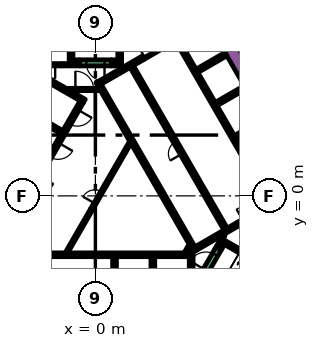
"""IFC4 building model, lengths in metres.
Left out: names, types, materials, properties, quantities, classifications, styles, units other than length and angle.
Written with IfcOpenShell. Run it as: python <this file> out.ifc"""

import sys

from ifc_helpers import new_model, si_unit, direction, frame, frame_2d, origin, place, context, subcontext, project, spatial, polyline, rectangle, outline, extrude, element, fill, save


model = new_model("IFC4")
c1 = context("Model", 3, precision=1e-05, world=origin(), true_north=direction((0.0, 1.0)))
c2 = subcontext(c1, "Body", "Model", "MODEL_VIEW")
j1 = project(units=[si_unit("LENGTHUNIT", "METRE"), si_unit("PLANEANGLEUNIT", "RADIAN")], contexts=[c1])
p1 = place(None, origin())
s1 = spatial("IfcSite", under=j1, at=p1, CompositionType="ELEMENT")
p2 = place(p1, origin())
s2 = spatial("IfcBuilding", under=s1, at=p2, CompositionType="ELEMENT")
p3 = place(p2, frame((0.0, 0.0, 6.0)))
s3 = spatial("IfcBuildingStorey", under=s2, at=p3, CompositionType="ELEMENT", Elevation=6.0)
p4 = place(p3, frame((6.776, 13.364, 0.0), z_axis=(0.0, 0.0, 1.0), x_axis=(0.500004177138, -0.8660229921, 0.0)))
e1 = element("IfcWall", 1, at=p4, inside=s3, PredefinedType="SOLIDWALL", context=c2, shape_type="SweptSolid", body=[
    extrude(rectangle(XDim=20.204, YDim=0.9, at=frame_2d((10.102, 0.0))), origin(), (0.0, 0.0, 1.0), 5.4),
])
p5 = place(p3, frame((8.334, -2.964, 0.0), z_axis=(0.0, 0.0, 1.0), x_axis=(0.866016039709, -0.500016218704, 0.0)))
e2 = element("IfcWall", 2, at=p5, inside=s3, PredefinedType="SOLIDWALL", context=c2, shape_type="SweptSolid", body=[
    extrude(rectangle(XDim=7.05, YDim=0.25, at=frame_2d((3.525, 0.0))), origin(), (0.0, 0.0, 1.0), 5.4),
])
p6 = place(p3, frame((8.168, -3.503, 0.0), z_axis=(0.0, 0.0, 1.0), x_axis=(0.49972245349, 0.866185586049, 0.0)))
e3 = element("IfcWall", 3, at=p6, inside=s3, PredefinedType="SOLIDWALL", context=c2, shape_type="SweptSolid", body=[
    extrude(rectangle(XDim=0.425, YDim=0.25, at=frame_2d((0.212, 0.0))), origin(), (0.0, 0.0, 1.0), 5.4),
])
p7 = place(p3, frame((1.6, 8.95, 0.0), z_axis=(0.0, 0.0, 1.0), x_axis=(0.0, 1.0, 0.0)))
e4 = element("IfcWall", 4, at=p7, inside=s3, PredefinedType="SOLIDWALL", context=c2, shape_type="SweptSolid", body=[
    extrude(rectangle(XDim=6.8, YDim=0.25, at=frame_2d((3.4, 0.0))), origin(), (0.0, 0.0, 1.0), 5.4),
])
p8 = place(p3, frame((1.05, 8.825, 0.0), z_axis=(0.0, 0.0, 1.0), x_axis=(1.0, 0.0, 0.0)))
e5 = element("IfcWall", 5, at=p8, inside=s3, PredefinedType="SOLIDWALL", context=c2, shape_type="SweptSolid", body=[
    extrude(rectangle(XDim=0.675, YDim=0.25, at=frame_2d((0.337, 0.0))), origin(), (0.0, 0.0, 1.0), 5.4),
])
p9 = place(p3, frame((-1.6, 8.7, 0.0), z_axis=(0.0, 0.0, 1.0), x_axis=(0.0, 1.0, 0.0)))
e6 = element("IfcWall", 6, at=p9, inside=s3, PredefinedType="SOLIDWALL", context=c2, shape_type="SweptSolid", body=[
    extrude(rectangle(XDim=7.05, YDim=0.25, at=frame_2d((3.525, 0.0))), origin(), (0.0, 0.0, 1.0), 5.4),
])
p10 = place(p3, frame((-1.475, 8.825, 0.0), z_axis=(0.0, 0.0, 1.0), x_axis=(1.0, 0.0, 0.0)))
e7 = element("IfcWall", 7, at=p10, inside=s3, PredefinedType="SOLIDWALL", context=c2, shape_type="SweptSolid", body=[
    extrude(rectangle(XDim=0.425, YDim=0.25, at=frame_2d((0.212, 0.0))), origin(), (0.0, 0.0, 1.0), 5.4),
])
p11 = place(p3, frame((-5.845, -3.875, 0.0), z_axis=(0.0, 0.0, 1.0), x_axis=(1.0, 0.0, 0.0)))
e8 = element("IfcWall", 8, at=p11, inside=s3, PredefinedType="SOLIDWALL", context=c2, shape_type="SweptSolid", body=[
    extrude(rectangle(XDim=12.27, YDim=0.25, at=frame_2d((6.135, 0.0))), origin(), (0.0, 0.0, 1.0), 5.4),
])
p12 = place(p3, frame((6.3, -7.27, 0.0), z_axis=(0.0, 0.0, 1.0), x_axis=(0.0, 1.0, 0.0)))
e9 = element("IfcWall", 9, at=p12, inside=s3, PredefinedType="SOLIDWALL", context=c2, shape_type="SweptSolid", body=[
    extrude(rectangle(XDim=3.27, YDim=0.25, at=frame_2d((1.635, 0.0))), origin(), (0.0, 0.0, 1.0), 5.4),
])
for number, where, z_axis, x_axis in (
    (10, (3.78, -4.0, 0.0), (0.0, 0.0, 1.0), (0.0, -1.0, 0.0)),
    (11, (1.26, -4.0, 0.0), (0.0, 0.0, 1.0), (0.0, -1.0, 0.0)),
):
    element("IfcWall", number, at=place(p3, frame(where, z_axis=z_axis, x_axis=x_axis)), inside=s3, PredefinedType="SOLIDWALL", context=c2, shape_type="SweptSolid", body=[
        extrude(rectangle(XDim=2.2, YDim=0.25, at=frame_2d((1.1, 0.0))), origin(), (0.0, 0.0, 1.0), 5.4),
    ])
p13 = place(p3, frame((11.678, -0.677, 0.0), z_axis=(0.0, 0.0, 1.0), x_axis=(-0.500003135297, 0.866023593612, 0.0)))
e12 = element("IfcWall", 12, at=p13, inside=s3, PredefinedType="SOLIDWALL", context=c2, shape_type="SweptSolid", body=[
    extrude(rectangle(XDim=12.85, YDim=0.25, at=frame_2d((6.425, 0.0))), origin(), (0.0, 0.0, 1.0), 5.4),
])
p14 = place(p3, origin())
e13 = element("IfcWall", 13, at=p14, inside=s3, PredefinedType="SOLIDWALL", context=c2, shape_type="SweptSolid", body=[
    extrude(outline(polyline([(6.552, -3.348), (6.677, -3.564), (6.46, -3.689), (4.897, -0.981), (0.332, 6.925), (0.335, 6.925), (0.335, 6.925), (0.335, 6.925), (0.335, 7.075), (0.335, 7.075), (0.335, 7.075), (0.245, 7.075), (0.079, 7.363), (0.035, 7.439), (0.252, 7.564), (0.377, 7.348), (6.552, -3.348)])), origin(), (0.0, 0.0, 1.0), 5.4),
])
p15 = place(p3, frame((0.314, 7.456, 0.0), z_axis=(0.0, 0.0, 1.0), x_axis=(0.866013897511, 0.50001992892, 0.0)))
e14 = element("IfcWall", 14, at=p15, inside=s3, PredefinedType="SOLIDWALL", context=c2, shape_type="SweptSolid", body=[
    extrude(rectangle(XDim=3.268, YDim=0.25, at=frame_2d((1.634, 0.0))), origin(), (0.0, 0.0, 1.0), 5.4),
])
p16 = place(p3, frame((6.614, -3.456, 0.0), z_axis=(0.0, 0.0, 1.0), x_axis=(0.86602447079, 0.500001615989, 0.0)))
e15 = element("IfcWall", 15, at=p16, inside=s3, PredefinedType="SOLIDWALL", context=c2, shape_type="SweptSolid", body=[
    extrude(rectangle(XDim=3.154, YDim=0.25, at=frame_2d((1.577, 0.0))), origin(), (0.0, 0.0, 1.0), 5.4),
])
for number, where, z_axis, x_axis in (
    (16, (8.589, 9.323, 0.0), (0.0, 0.0, 1.0), (-0.866, -0.5, 0.0)),
    (17, (7.944, 6.041, 0.0), (0.0, 0.0, 1.0), (0.866, 0.5, 0.0)),
    (18, (9.204, 3.859, 0.0), (0.0, 0.0, 1.0), (0.866, 0.5, 0.0)),
):
    element("IfcWall", number, at=place(p3, frame(where, z_axis=z_axis, x_axis=x_axis)), inside=s3, PredefinedType="SOLIDWALL", context=c2, shape_type="SweptSolid", body=[
        extrude(rectangle(XDim=2.2, YDim=0.25, at=frame_2d((1.1, 0.0))), origin(), (0.0, 0.0, 1.0), 5.4),
    ])
p17 = place(p3, frame((-8.06, -1.311, 0.0), z_axis=(0.0, 0.0, 1.0), x_axis=(0.50000273126, 0.866023826885, 0.0)))
e19 = element("IfcWall", 19, at=p17, inside=s3, PredefinedType="SOLIDWALL", context=c2, shape_type="SweptSolid", body=[
    extrude(rectangle(XDim=10.33, YDim=0.25, at=frame_2d((5.165, 0.0))), origin(), (0.0, 0.0, 1.0), 5.4),
])
p18 = place(p3, frame((-1.819, 6.87, 0.0), z_axis=(0.0, 0.0, 1.0), x_axis=(-0.866294599386, 0.499533449405, 0.0)))
e20 = element("IfcWall", 20, at=p18, inside=s3, PredefinedType="SOLIDWALL", context=c2, shape_type="SweptSolid", body=[
    extrude(rectangle(XDim=0.41, YDim=0.25, at=frame_2d((0.205, 0.0))), origin(), (0.0, 0.0, 1.0), 5.4),
])
p19 = place(p3, frame((-2.849, 7.465, 0.0), z_axis=(0.0, 0.0, 1.0), x_axis=(0.865955664968, -0.500120771724, 0.0)))
e21 = element("IfcWall", 21, at=p19, inside=s3, PredefinedType="SOLIDWALL", context=c2, shape_type="SweptSolid", body=[
    extrude(rectangle(XDim=0.778, YDim=0.25, at=frame_2d((0.389, 0.0))), origin(), (0.0, 0.0, 1.0), 5.4),
])
p20 = place(p3, frame((-0.728, 6.24, 0.0), z_axis=(0.0, 0.0, 1.0), x_axis=(-0.866002680491, 0.500039355833, 0.0)))
e22 = element("IfcWall", 22, at=p20, inside=s3, PredefinedType="SOLIDWALL", context=c2, shape_type="SweptSolid", body=[
    extrude(rectangle(XDim=1.178, YDim=0.25, at=frame_2d((0.589, 0.0))), origin(), (0.0, 0.0, 1.0), 5.4),
])
p21 = place(p3, frame((-2.204, 4.182, 0.0), z_axis=(0.0, 0.0, 1.0), x_axis=(-0.866008176907, 0.50002983664, 0.0)))
e23 = element("IfcWall", 23, at=p21, inside=s3, PredefinedType="SOLIDWALL", context=c2, shape_type="SweptSolid", body=[
    extrude(rectangle(XDim=2.2, YDim=0.25, at=frame_2d((1.1, 0.0))), origin(), (0.0, 0.0, 1.0), 5.4),
])
p22 = place(p3, frame((-2.196, 8.625, 0.0), z_axis=(0.0, 0.0, 1.0), x_axis=(1.0, 0.0, 0.0)))
e24 = element("IfcWall", 24, at=p22, inside=s3, PredefinedType="PARTITIONING", context=c2, shape_type="SweptSolid", body=[
    extrude(rectangle(XDim=1.146, YDim=0.15, at=frame_2d((0.573, 0.0))), origin(), (0.0, 0.0, 1.0), 4.5),
])
p23 = place(p3, frame((5.936, -3.718, 0.0), z_axis=(0.0, 0.0, 1.0), x_axis=(0.499890179513, 0.866088799389, 0.0)))
e25 = element("IfcWall", 25, at=p23, inside=s3, PredefinedType="PARTITIONING", context=c2, shape_type="SweptSolid", body=[
    extrude(rectangle(XDim=0.504, YDim=0.15, at=frame_2d((0.252, 0.0))), origin(), (0.0, 0.0, 1.0), 4.5),
])
p24 = place(p3, frame((8.459, -2.599, 0.0), z_axis=(0.0, 0.0, 1.0), x_axis=(-0.500041054325, -0.866001699761, 0.0)))
e26 = element("IfcWall", 26, at=p24, inside=s3, PredefinedType="PARTITIONING", context=c2, shape_type="SweptSolid", body=[
    extrude(rectangle(XDim=0.929, YDim=0.15, at=frame_2d((0.464, 0.0))), origin(), (0.0, 0.0, 1.0), 5.4),
])
for number, where, z_axis, x_axis in (
    (27, (-1.887, -3.718, 0.0), (0.0, 0.0, 1.0), (0.5, 0.866, 0.0)),
    (28, (0.645, 0.667, 0.0), (0.0, 0.0, 1.0), (0.5, 0.866, 0.0)),
):
    element("IfcWall", number, at=place(p3, frame(where, z_axis=z_axis, x_axis=x_axis)), inside=s3, PredefinedType="PARTITIONING", context=c2, shape_type="SweptSolid", body=[
        extrude(rectangle(XDim=3.263, YDim=0.15, at=frame_2d((1.632, 0.0))), origin(), (0.0, 0.0, 1.0), 4.5),
    ])
p25 = place(p3, frame((1.05, 8.625, 0.0), z_axis=(0.0, 0.0, 1.0), x_axis=(1.0, 0.0, 0.0)))
e29 = element("IfcWall", 29, at=p25, inside=s3, PredefinedType="PARTITIONING", context=c2, shape_type="SweptSolid", body=[
    extrude(rectangle(XDim=0.514, YDim=0.15, at=frame_2d((0.257, 0.0))), origin(), (0.0, 0.0, 1.0), 4.5),
])
p26 = place(p3, frame((8.565, -2.185, 0.0), z_axis=(0.0, 0.0, 1.0), x_axis=(-0.499997954832, 0.866026584559, 0.0)))
e30 = element("IfcWall", 30, at=p26, inside=s3, PredefinedType="SOLIDWALL", context=c2, shape_type="SweptSolid", body=[
    extrude(rectangle(XDim=12.35, YDim=0.25, at=frame_2d((6.175, 0.0))), origin(), (0.0, 0.0, 1.0), 5.4),
])
p27 = place(p26, frame((5.725, 0.0, 0.0)))
e31 = element("IfcOpeningElement", 31, at=p27, cuts=e30, PredefinedType="OPENING", context=c2, shape_type="SweptSolid", body=[
    extrude(rectangle(XDim=0.9, YDim=2.1, at=frame_2d((0.45, 1.05))), frame((0.0, 0.135, 0.0), z_axis=(0.0, -1.0, 0.0), x_axis=(1.0, 0.0, 0.0)), (0.0, 0.0, 1.0), 0.27),
])
p28 = place(p3, frame((-0.898, 6.194, 0.0), z_axis=(0.0, 0.0, 1.0), x_axis=(-0.499996202215, -0.866027596426, 0.0)))
e32 = element("IfcWall", 32, at=p28, inside=s3, PredefinedType="SOLIDWALL", context=c2, shape_type="SweptSolid", body=[
    extrude(rectangle(XDim=9.83, YDim=0.25, at=frame_2d((4.915, 0.0))), origin(), (0.0, 0.0, 1.0), 5.4),
])
p29 = place(p28, frame((0.585, 0.0, 0.0)))
e33 = element("IfcOpeningElement", 33, at=p29, cuts=e32, PredefinedType="OPENING", context=c2, shape_type="SweptSolid", body=[
    extrude(rectangle(XDim=1.1, YDim=2.1, at=frame_2d((0.55, 1.05))), frame((0.0, 0.135, 0.0), z_axis=(0.0, -1.0, 0.0), x_axis=(1.0, 0.0, 0.0)), (0.0, 0.0, 1.0), 0.27),
])
p30 = place(p28, frame((3.105, 0.0, 0.0)))
e34 = element("IfcOpeningElement", 34, at=p30, cuts=e32, PredefinedType="OPENING", context=c2, shape_type="SweptSolid", body=[
    extrude(rectangle(XDim=1.1, YDim=2.1, at=frame_2d((0.55, 1.05))), frame((0.0, 0.135, 0.0), z_axis=(0.0, -1.0, 0.0), x_axis=(1.0, 0.0, 0.0)), (0.0, 0.0, 1.0), 0.27),
])
p31 = place(p28, frame((5.625, 0.0, 0.0)))
e35 = element("IfcOpeningElement", 35, at=p31, cuts=e32, PredefinedType="OPENING", context=c2, shape_type="SweptSolid", body=[
    extrude(rectangle(XDim=1.1, YDim=2.1, at=frame_2d((0.55, 1.05))), frame((0.0, 0.135, 0.0), z_axis=(0.0, -1.0, 0.0), x_axis=(1.0, 0.0, 0.0)), (0.0, 0.0, 1.0), 0.27),
])
p32 = place(p28, frame((8.145, 0.0, 0.0)))
e36 = element("IfcOpeningElement", 36, at=p32, cuts=e32, PredefinedType="OPENING", context=c2, shape_type="SweptSolid", body=[
    extrude(rectangle(XDim=1.1, YDim=2.1, at=frame_2d((0.55, 1.05))), frame((0.0, 0.135, 0.0), z_axis=(0.0, -1.0, 0.0), x_axis=(1.0, 0.0, 0.0)), (0.0, 0.0, 1.0), 0.27),
])
p33 = place(p3, frame((7.053, -5.284, 0.0), z_axis=(0.0, 0.0, 1.0), x_axis=(0.500078061341, 0.865980330357, 0.0)))
e37 = element("IfcWall", 37, at=p33, inside=s3, PredefinedType="SOLIDWALL", context=c2, shape_type="SweptSolid", body=[
    extrude(rectangle(XDim=2.1, YDim=0.4, at=frame_2d((1.05, 0.0))), origin(), (0.0, 0.0, 1.0), 5.4),
])
p34 = place(p33, frame((0.45, 0.0, 0.0)))
e38 = element("IfcOpeningElement", 38, at=p34, cuts=e37, PredefinedType="OPENING", context=c2, shape_type="SweptSolid", body=[
    extrude(rectangle(XDim=1.2, YDim=2.1, at=frame_2d((0.6, 1.05))), frame((0.0, 0.21, 0.0), z_axis=(0.0, -1.0, 0.0), x_axis=(1.0, 0.0, 0.0)), (0.0, 0.0, 1.0), 0.42),
])
p35 = place(p3, frame((9.346, -1.879, 0.0), z_axis=(0.0, 0.0, 1.0), x_axis=(0.866047807691, 0.499961193289, 0.0)))
e39 = element("IfcWall", 39, at=p35, inside=s3, PredefinedType="SOLIDWALL", context=c2, shape_type="SweptSolid", body=[
    extrude(rectangle(XDim=1.8, YDim=0.25, at=frame_2d((0.9, 0.0))), origin(), (0.0, 0.0, 1.0), 5.4),
])
p36 = place(p35, frame((0.45, 0.0, 0.0)))
e40 = element("IfcOpeningElement", 40, at=p36, cuts=e39, PredefinedType="OPENING", context=c2, shape_type="SweptSolid", body=[
    extrude(rectangle(XDim=0.9, YDim=2.1, at=frame_2d((0.45, 1.05))), frame((0.0, 0.135, 0.0), z_axis=(0.0, -1.0, 0.0), x_axis=(1.0, 0.0, 0.0)), (0.0, 0.0, 1.0), 0.27),
])
p37 = place(p3, frame((1.05, 8.75, 0.0), z_axis=(0.0, 0.0, 1.0), x_axis=(-1.0, 0.0, 0.0)))
e41 = element("IfcWall", 41, at=p37, inside=s3, PredefinedType="SOLIDWALL", context=c2, shape_type="SweptSolid", body=[
    extrude(rectangle(XDim=2.1, YDim=0.4, at=frame_2d((1.05, 0.0))), origin(), (0.0, 0.0, 1.0), 5.4),
])
p38 = place(p37, frame((0.45, 0.0, 0.0)))
e42 = element("IfcOpeningElement", 42, at=p38, cuts=e41, PredefinedType="OPENING", context=c2, shape_type="SweptSolid", body=[
    extrude(rectangle(XDim=1.2, YDim=2.1, at=frame_2d((0.6, 1.05))), frame((0.0, 0.21, 0.0), z_axis=(0.0, -1.0, 0.0), x_axis=(1.0, 0.0, 0.0)), (0.0, 0.0, 1.0), 0.42),
])
p39 = place(p3, frame((-2.196, 8.625, 0.0), z_axis=(0.0, 0.0, 1.0), x_axis=(-1.0, 0.0, 0.0)))
e43 = element("IfcWall", 43, at=p39, inside=s3, PredefinedType="PARTITIONING", context=c2, shape_type="SweptSolid", body=[
    extrude(rectangle(XDim=1.8, YDim=0.15, at=frame_2d((0.9, 0.0))), origin(), (0.0, 0.0, 1.0), 4.5),
])
p40 = place(p39, frame((0.45, 0.0, 0.0)))
e44 = element("IfcOpeningElement", 44, at=p40, cuts=e43, PredefinedType="OPENING", context=c2, shape_type="SweptSolid", body=[
    extrude(rectangle(XDim=0.9, YDim=2.1, at=frame_2d((0.45, 1.05))), frame((0.0, 0.085, 0.0), z_axis=(0.0, -1.0, 0.0), x_axis=(1.0, 0.0, 0.0)), (0.0, 0.0, 1.0), 0.17),
])
p41 = place(p3, frame((-1.765, 7.0, 0.0), z_axis=(0.0, 0.0, 1.0), x_axis=(1.0, 0.0, 0.0)))
e45 = element("IfcWall", 45, at=p41, inside=s3, PredefinedType="PARTITIONING", context=c2, shape_type="SweptSolid", body=[
    extrude(rectangle(XDim=2.1, YDim=0.15, at=frame_2d((1.05, 0.0))), origin(), (0.0, 0.0, 1.0), 4.5),
])
p42 = place(p41, frame((0.45, 0.0, 0.0)))
e46 = element("IfcOpeningElement", 46, at=p42, cuts=e45, PredefinedType="OPENING", context=c2, shape_type="SweptSolid", body=[
    extrude(rectangle(XDim=1.2, YDim=2.1, at=frame_2d((0.6, 1.05))), frame((0.0, 0.085, 0.0), z_axis=(0.0, -1.0, 0.0), x_axis=(1.0, 0.0, 0.0)), (0.0, 0.0, 1.0), 0.17),
])
p43 = place(p3, frame((3.183, 9.02, 0.0), z_axis=(0.0, 0.0, 1.0), x_axis=(0.866034573852, 0.49998411664, 0.0)))
e47 = element("IfcWall", 47, at=p43, inside=s3, PredefinedType="PARTITIONING", context=c2, shape_type="SweptSolid", body=[
    extrude(rectangle(XDim=1.4, YDim=0.09, at=frame_2d((0.7, 0.0))), origin(), (0.0, 0.0, 1.0), 4.5),
])
p44 = place(p43, frame((0.1, 0.0, 0.0)))
e48 = element("IfcOpeningElement", 48, at=p44, cuts=e47, PredefinedType="OPENING", context=c2, shape_type="SweptSolid", body=[
    extrude(rectangle(XDim=1.2, YDim=2.1, at=frame_2d((0.6, 1.05))), frame((0.0, 0.055, 0.0), z_axis=(0.0, -1.0, 0.0), x_axis=(1.0, 0.0, 0.0)), (0.0, 0.0, 1.0), 0.11),
])
p45 = place(p3, frame((-0.255, -0.892, 0.0), z_axis=(0.0, 0.0, 1.0), x_axis=(0.500062916607, 0.865989075817, 0.0)))
e49 = element("IfcWall", 49, at=p45, inside=s3, PredefinedType="PARTITIONING", context=c2, shape_type="SweptSolid", body=[
    extrude(rectangle(XDim=1.8, YDim=0.15, at=frame_2d((0.9, 0.0))), origin(), (0.0, 0.0, 1.0), 4.5),
])
p46 = place(p45, frame((0.45, 0.0, 0.0)))
e50 = element("IfcOpeningElement", 50, at=p46, cuts=e49, PredefinedType="OPENING", context=c2, shape_type="SweptSolid", body=[
    extrude(rectangle(XDim=0.9, YDim=2.1, at=frame_2d((0.45, 1.05))), frame((0.0, 0.085, 0.0), z_axis=(0.0, -1.0, 0.0), x_axis=(1.0, 0.0, 0.0)), (0.0, 0.0, 1.0), 0.17),
])
p47 = place(p27, origin())
e51 = element("IfcDoor", 51, at=p47, inside=s3, OperationType="SINGLE_SWING_LEFT", PredefinedType="DOOR", context=c2, shape_type="SweptSolid", body=[
    extrude(rectangle(XDim=0.9, YDim=2.1, at=frame_2d((0.45, 1.05))), frame((0.0, 0.025, 0.0), z_axis=(0.0, -1.0, 0.0), x_axis=(1.0, 0.0, 0.0)), (0.0, 0.0, 1.0), 0.05),
])
fill(e31, e51)
p48 = place(p29, origin())
e52 = element("IfcDoor", 52, at=p48, inside=s3, OperationType="DOUBLE_DOOR_SLIDING", PredefinedType="DOOR", context=c2, shape_type="SweptSolid", body=[
    extrude(rectangle(XDim=1.1, YDim=2.1, at=frame_2d((0.55, 1.05))), frame((0.0, 0.025, 0.0), z_axis=(0.0, -1.0, 0.0), x_axis=(1.0, 0.0, 0.0)), (0.0, 0.0, 1.0), 0.05),
])
fill(e33, e52)
p49 = place(p30, origin())
e53 = element("IfcDoor", 53, at=p49, inside=s3, OperationType="DOUBLE_DOOR_SLIDING", PredefinedType="DOOR", context=c2, shape_type="SweptSolid", body=[
    extrude(rectangle(XDim=1.1, YDim=2.1, at=frame_2d((0.55, 1.05))), frame((0.0, 0.025, 0.0), z_axis=(0.0, -1.0, 0.0), x_axis=(1.0, 0.0, 0.0)), (0.0, 0.0, 1.0), 0.05),
])
fill(e34, e53)
p50 = place(p34, origin())
e54 = element("IfcDoor", 54, at=p50, inside=s3, OperationType="SINGLE_SWING_LEFT", PredefinedType="DOOR", context=c2, shape_type="SweptSolid", body=[
    extrude(rectangle(XDim=1.2, YDim=2.1, at=frame_2d((0.6, 1.05))), frame((0.0, 0.025, 0.0), z_axis=(0.0, -1.0, 0.0), x_axis=(1.0, 0.0, 0.0)), (0.0, 0.0, 1.0), 0.05),
])
fill(e38, e54)
p51 = place(p38, origin())
e55 = element("IfcDoor", 55, at=p51, inside=s3, OperationType="SINGLE_SWING_LEFT", PredefinedType="DOOR", context=c2, shape_type="SweptSolid", body=[
    extrude(rectangle(XDim=1.2, YDim=2.1, at=frame_2d((0.6, 1.05))), frame((0.0, 0.025, 0.0), z_axis=(0.0, -1.0, 0.0), x_axis=(1.0, 0.0, 0.0)), (0.0, 0.0, 1.0), 0.05),
])
fill(e42, e55)
p52 = place(p40, origin())
e56 = element("IfcDoor", 56, at=p52, inside=s3, OperationType="SINGLE_SWING_LEFT", PredefinedType="DOOR", context=c2, shape_type="SweptSolid", body=[
    extrude(rectangle(XDim=0.9, YDim=2.1, at=frame_2d((0.45, 1.05))), frame((0.0, 0.025, 0.0), z_axis=(0.0, -1.0, 0.0), x_axis=(1.0, 0.0, 0.0)), (0.0, 0.0, 1.0), 0.05),
])
fill(e44, e56)
p53 = place(p42, origin())
e57 = element("IfcDoor", 57, at=p53, inside=s3, OperationType="SINGLE_SWING_LEFT", PredefinedType="DOOR", context=c2, shape_type="SweptSolid", body=[
    extrude(rectangle(XDim=1.2, YDim=2.1, at=frame_2d((0.6, 1.05))), frame((0.0, 0.025, 0.0), z_axis=(0.0, -1.0, 0.0), x_axis=(1.0, 0.0, 0.0)), (0.0, 0.0, 1.0), 0.05),
])
fill(e46, e57)
p54 = place(p44, origin())
e58 = element("IfcDoor", 58, at=p54, inside=s3, OperationType="SINGLE_SWING_LEFT", PredefinedType="DOOR", context=c2, shape_type="SweptSolid", body=[
    extrude(rectangle(XDim=1.2, YDim=2.1, at=frame_2d((0.6, 1.05))), frame((0.0, 0.025, 0.0), z_axis=(0.0, -1.0, 0.0), x_axis=(1.0, 0.0, 0.0)), (0.0, 0.0, 1.0), 0.05),
])
fill(e48, e58)
p55 = place(p46, origin())
e59 = element("IfcDoor", 59, at=p55, inside=s3, OperationType="SINGLE_SWING_LEFT", PredefinedType="DOOR", context=c2, shape_type="SweptSolid", body=[
    extrude(rectangle(XDim=0.9, YDim=2.1, at=frame_2d((0.45, 1.05))), frame((0.0, 0.025, 0.0), z_axis=(0.0, -1.0, 0.0), x_axis=(1.0, 0.0, 0.0)), (0.0, 0.0, 1.0), 0.05),
])
fill(e50, e59)
save(model, sys.argv[1])
